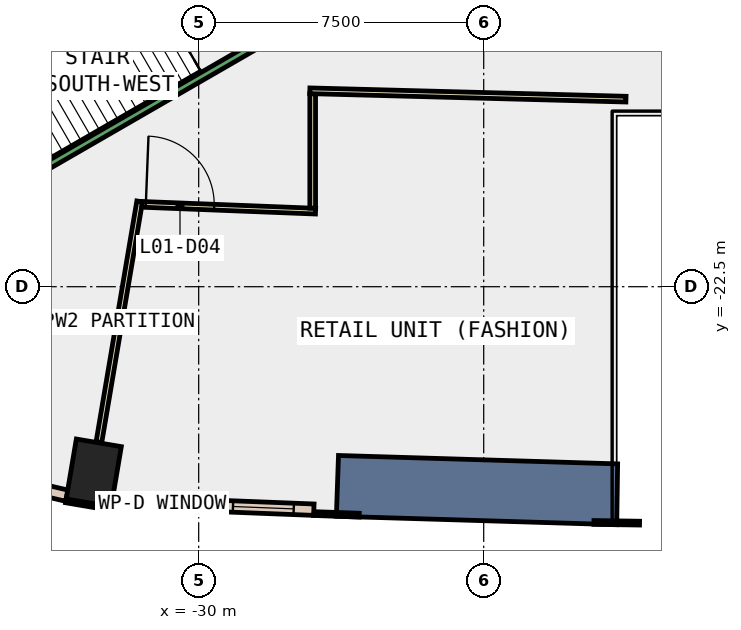
"""IFC4 building model, lengths in metres.
Left out: names, types, materials, properties, quantities, classifications, styles, units other than length and angle.
Written with IfcOpenShell. Run it as: python <this file> out.ifc"""

import sys

from ifc_helpers import new_model, si_unit, direction, frame, frame_2d, origin, origin_2d, place, context, subcontext, project, spatial, polyline, rectangle, outline, extrude, element, fill, save


model = new_model("IFC4")
c1 = context("Model", 3, precision=1e-05, world=origin(), true_north=direction((0.0, 1.0)))
c2 = subcontext(c1, "Body", "Model", "MODEL_VIEW")
j1 = project(units=[si_unit("LENGTHUNIT", "METRE"), si_unit("PLANEANGLEUNIT", "RADIAN")], contexts=[c1])
p1 = place(None, origin())
s1 = spatial("IfcSite", under=j1, at=p1, CompositionType="ELEMENT")
p2 = place(p1, origin())
s2 = spatial("IfcBuilding", under=s1, at=p2, CompositionType="ELEMENT")
p3 = place(p2, frame((0.0, 0.0, 9.0)))
s3 = spatial("IfcBuildingStorey", under=s2, at=p3, CompositionType="ELEMENT", Elevation=9.0)
p4 = place(p3, frame((-32.761, -27.397, -0.45), z_axis=(0.0, 0.0, 1.0), x_axis=(-0.98600476771, 0.166717119856, 0.0)))
e1 = element("IfcColumn", 1, at=p4, inside=s3, PredefinedType="COLUMN", context=c2, shape_type="SweptSolid", body=[
    extrude(rectangle(XDim=1.2, YDim=1.6, at=origin_2d()), origin(), (0.0, 0.0, 1.0), 6.0),
])
p5 = place(p3, frame((0.0, 0.0, -0.45)))
e2 = element("IfcWall", 2, at=p5, inside=s3, PredefinedType="SHEAR", context=c2, shape_type="SweptSolid", body=[
    extrude(outline(polyline([(-26.377, -28.54), (-19.0, -28.762), (-18.976, -27.162), (-26.321, -26.941), (-26.377, -28.54)])), origin(), (0.0, 0.0, 1.0), 6.0),
])
p6 = place(p3, frame((-33.494, -28.135, 0.0), z_axis=(0.0, 0.0, 1.0), x_axis=(0.986011774526, -0.166675674579, 0.0)))
e3 = element("IfcWall", 3, at=p6, inside=s3, PredefinedType="STANDARD", context=c2, shape_type="SweptSolid", body=[
    extrude(rectangle(XDim=1.2, YDim=0.1, at=frame_2d((0.6, 0.0))), origin(), (0.0, 0.0, 1.0), 5.55),
])
p7 = place(p3, frame((-26.975, -28.469, 0.0), z_axis=(0.0, 0.0, 1.0), x_axis=(0.999387493042, -0.034994838926, 0.0)))
e4 = element("IfcWall", 4, at=p7, inside=s3, PredefinedType="STANDARD", context=c2, shape_type="SweptSolid", body=[
    extrude(rectangle(XDim=1.2, YDim=0.1, at=frame_2d((0.6, 0.0))), origin(), (0.0, 0.0, 1.0), 5.55),
])
p8 = place(p3, frame((-19.599, -28.703, 0.0), z_axis=(0.0, 0.0, 1.0), x_axis=(0.999886724523, -0.015051183404, 0.0)))
e5 = element("IfcWall", 5, at=p8, inside=s3, PredefinedType="STANDARD", context=c2, shape_type="SweptSolid", body=[
    extrude(rectangle(XDim=1.2, YDim=0.1, at=frame_2d((0.6, 0.0))), origin(), (0.0, 0.0, 1.0), 5.55),
])
p9 = place(p3, frame((-32.282, -28.159, 0.0), z_axis=(0.0, 0.0, 1.0), x_axis=(0.999234205654, -0.039128023863, 0.0)))
e6 = element("IfcWall", 6, at=p9, inside=s3, PredefinedType="STANDARD", context=c2, shape_type="SweptSolid", body=[
    extrude(rectangle(XDim=5.316, YDim=0.3, at=frame_2d((2.658, 0.0))), origin(), (0.0, 0.0, 1.0), 5.55),
])
p10 = place(p9, frame((0.529, 0.0, 1.0)))
e7 = element("IfcOpeningElement", 7, at=p10, cuts=e6, PredefinedType="OPENING", context=c2, shape_type="SweptSolid", body=[
    extrude(rectangle(XDim=1.6, YDim=4.0, at=frame_2d((0.8, 2.0))), frame((0.0, 0.16, 0.0), z_axis=(0.0, -1.0, 0.0), x_axis=(1.0, 0.0, 0.0)), (0.0, 0.0, 1.0), 0.32),
])
p11 = place(p9, frame((3.187, 0.0, 1.0)))
e8 = element("IfcOpeningElement", 8, at=p11, cuts=e6, PredefinedType="OPENING", context=c2, shape_type="SweptSolid", body=[
    extrude(rectangle(XDim=1.6, YDim=4.0, at=frame_2d((0.8, 2.0))), frame((0.0, 0.16, 0.0), z_axis=(0.0, -1.0, 0.0), x_axis=(1.0, 0.0, 0.0)), (0.0, 0.0, 1.0), 0.32),
])
p12 = place(p3, frame((-36.923, -27.189, 0.0), z_axis=(0.0, 0.0, 1.0), x_axis=(0.97357041301, -0.228387063799, 0.0)))
e9 = element("IfcWall", 9, at=p12, inside=s3, PredefinedType="STANDARD", context=c2, shape_type="SweptSolid", body=[
    extrude(rectangle(XDim=3.547, YDim=0.3, at=frame_2d((1.773, 0.0))), origin(), (0.0, 0.0, 1.0), 5.55),
])
p13 = place(p12, frame((0.973, 0.0, 1.0)))
e10 = element("IfcOpeningElement", 10, at=p13, cuts=e9, PredefinedType="OPENING", context=c2, shape_type="SweptSolid", body=[
    extrude(rectangle(XDim=1.6, YDim=4.0, at=frame_2d((0.8, 2.0))), frame((0.0, 0.16, 0.0), z_axis=(0.0, -1.0, 0.0), x_axis=(1.0, 0.0, 0.0)), (0.0, 0.0, 1.0), 0.32),
])
p14 = place(p3, frame((-32.625, -26.588, 0.0), z_axis=(0.0, 0.0, 1.0), x_axis=(0.16693222012, 0.985968373674, 0.0)))
e11 = element("IfcWall", 11, at=p14, inside=s3, PredefinedType="PARTITIONING", context=c2, shape_type="SweptSolid", body=[
    extrude(rectangle(XDim=6.422, YDim=0.15, at=frame_2d((3.211, 0.0))), origin(), (0.0, 0.0, 1.0), 5.55),
])
p15 = place(p3, frame((-31.491, -20.333, 0.0), z_axis=(0.0, 0.0, 1.0), x_axis=(0.99923281192, -0.039163600211, 0.0)))
e12 = element("IfcWall", 12, at=p15, inside=s3, PredefinedType="PARTITIONING", context=c2, shape_type="SweptSolid", body=[
    extrude(rectangle(XDim=4.569, YDim=0.15, at=frame_2d((2.285, 0.0))), origin(), (0.0, 0.0, 1.0), 5.55),
])
p16 = place(p15, frame((0.1, 0.0, 0.0)))
e13 = element("IfcOpeningElement", 13, at=p16, cuts=e12, PredefinedType="OPENING", context=c2, shape_type="SweptSolid", body=[
    extrude(rectangle(XDim=1.8, YDim=2.1, at=frame_2d((0.9, 1.05))), frame((0.0, 0.085, 0.0), z_axis=(0.0, -1.0, 0.0), x_axis=(1.0, 0.0, 0.0)), (0.0, 0.0, 1.0), 0.17),
])
p17 = place(p3, frame((-27.0, -20.434, 0.0), z_axis=(0.0, 0.0, 1.0), x_axis=(0.0, 1.0, 0.0)))
e14 = element("IfcWall", 14, at=p17, inside=s3, PredefinedType="PARTITIONING", context=c2, shape_type="SweptSolid", body=[
    extrude(rectangle(XDim=3.012, YDim=0.15, at=frame_2d((1.506, 0.0))), origin(), (0.0, 0.0, 1.0), 5.55),
])
p18 = place(p3, frame((-27.075, -17.345, 0.0), z_axis=(0.0, 0.0, 1.0), x_axis=(0.999650499667, -0.026436310543, 0.0)))
e15 = element("IfcWall", 15, at=p18, inside=s3, PredefinedType="PARTITIONING", context=c2, shape_type="SweptSolid", body=[
    extrude(rectangle(XDim=8.321, YDim=0.15, at=frame_2d((4.16, 0.0))), origin(), (0.0, 0.0, 1.0), 5.55),
])
for number, where, z_axis, x_axis in (
    (16, (-30.222, -12.755, 0.0), (0.0, 0.0, 1.0), (-0.866, -0.5, 0.0)),
    (17, (-28.322, -16.045, 0.0), (0.0, 0.0, 1.0), (-0.866, -0.5, 0.0)),
):
    element("IfcWall", number, at=place(p3, frame(where, z_axis=z_axis, x_axis=x_axis)), inside=s3, PredefinedType="STANDARD", context=c2, shape_type="SweptSolid", body=[
        extrude(rectangle(XDim=9.8, YDim=0.2, at=frame_2d((4.9, 0.0))), origin(), (0.0, 0.0, 1.0), 5.55),
    ])
p19 = place(p10, origin())
e18 = element("IfcWindow", 18, at=p19, inside=s3, PartitioningType="SINGLE_PANEL", PredefinedType="WINDOW", context=c2, shape_type="SweptSolid", body=[
    extrude(rectangle(XDim=1.6, YDim=4.0, at=frame_2d((0.8, 2.0))), frame((0.0, 0.03, 0.0), z_axis=(0.0, -1.0, 0.0), x_axis=(1.0, 0.0, 0.0)), (0.0, 0.0, 1.0), 0.06),
])
fill(e7, e18)
p20 = place(p11, origin())
e19 = element("IfcWindow", 19, at=p20, inside=s3, PartitioningType="SINGLE_PANEL", PredefinedType="WINDOW", context=c2, shape_type="SweptSolid", body=[
    extrude(rectangle(XDim=1.6, YDim=4.0, at=frame_2d((0.8, 2.0))), frame((0.0, 0.03, 0.0), z_axis=(0.0, -1.0, 0.0), x_axis=(1.0, 0.0, 0.0)), (0.0, 0.0, 1.0), 0.06),
])
fill(e8, e19)
p21 = place(p16, origin())
e20 = element("IfcDoor", 20, at=p21, inside=s3, OperationType="DOUBLE_DOOR_SINGLE_SWING", PredefinedType="DOOR", context=c2, shape_type="SweptSolid", body=[
    extrude(rectangle(XDim=1.8, YDim=2.1, at=frame_2d((0.9, 1.05))), frame((0.0, 0.025, 0.0), z_axis=(0.0, -1.0, 0.0), x_axis=(1.0, 0.0, 0.0)), (0.0, 0.0, 1.0), 0.05),
])
fill(e13, e20)
save(model, sys.argv[1])
